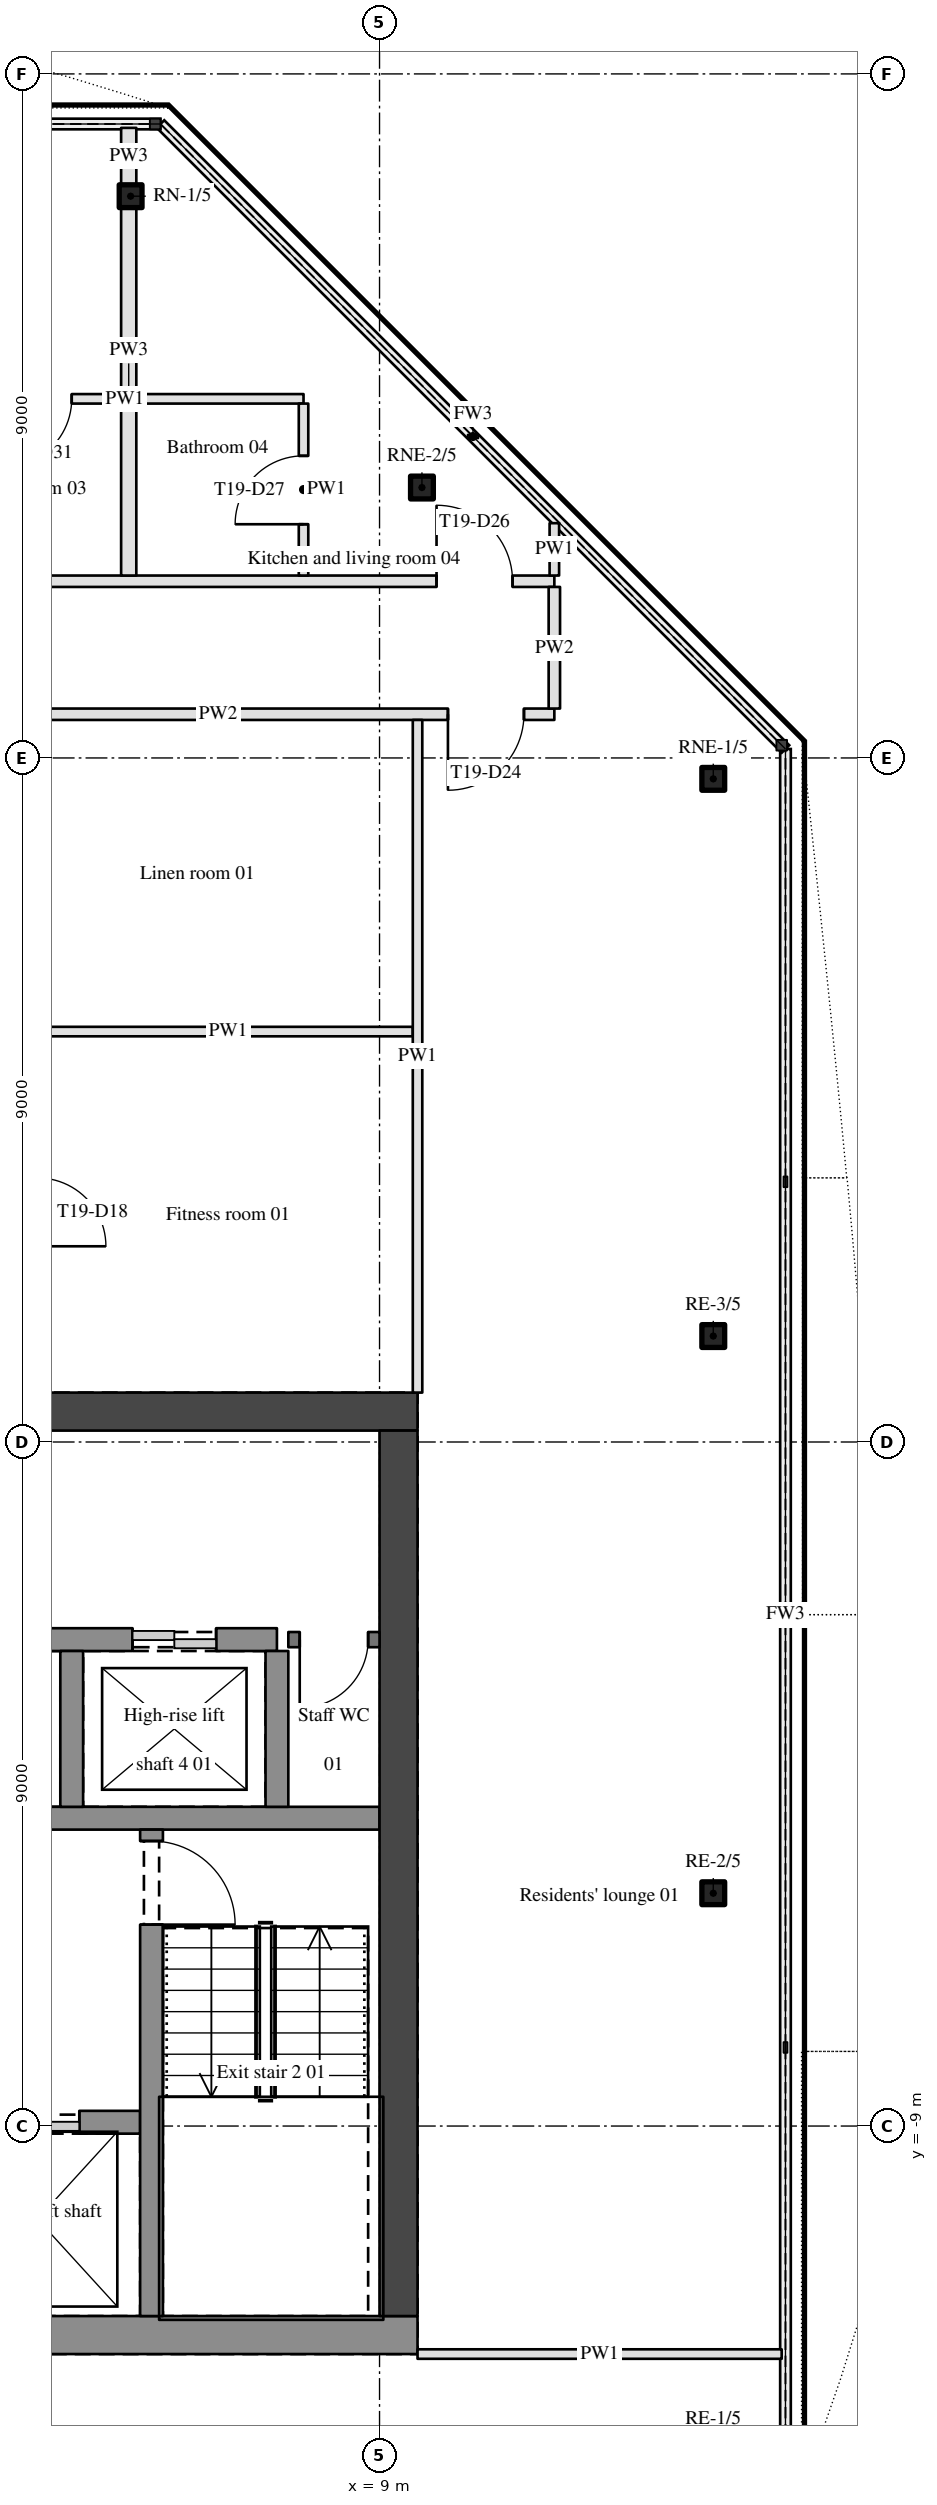
"""IFC4 building model, lengths in metres.
Left out: names, types, materials, properties, quantities, classifications, styles, units other than length and angle.
Written with IfcOpenShell. Run it as: python <this file> out.ifc"""

import sys

from ifc_helpers import new_model, si_unit, direction, frame, frame_2d, origin, origin_2d, place, context, subcontext, project, spatial, rectangle, hollow_rectangle, extrude, element, fill, save


model = new_model("IFC4")
c1 = context("Model", 3, precision=1e-05, world=origin(), true_north=direction((0.0, 1.0)))
c2 = subcontext(c1, "Body", "Model", "MODEL_VIEW")
j1 = project(units=[si_unit("LENGTHUNIT", "METRE"), si_unit("PLANEANGLEUNIT", "RADIAN")], contexts=[c1])
p1 = place(None, origin())
s1 = spatial("IfcSite", under=j1, at=p1, CompositionType="ELEMENT")
p2 = place(p1, origin())
s2 = spatial("IfcBuilding", under=s1, at=p2, CompositionType="ELEMENT")
p3 = place(p2, frame((0.0, 0.0, 251.85)))
s3 = spatial("IfcBuildingStorey", under=s2, at=p3, CompositionType="ELEMENT", Elevation=251.85)
for number, where, z_axis, x_axis in (
    (1, (13.391, -5.937, 0.0), (0.0, 0.0, 1.0), (1.0, 0.0, 0.0)),
    (2, (13.391, 1.394, 0.0), (0.0, 0.0, 1.0), (1.0, 0.0, 0.0)),
    (3, (13.391, 8.725, 0.0), (0.0, 0.0, 1.0), (1.0, 0.0, 0.0)),
    (4, (9.558, 12.558, 0.0), (0.0, 0.0, 1.0), (1.0, 0.0, 0.0)),
    (5, (5.725, 16.391, 0.0), (0.0, 0.0, 1.0), (1.0, 0.0, 0.0)),
):
    element("IfcColumn", number, at=place(p3, frame(where, z_axis=z_axis, x_axis=x_axis)), inside=s3, PredefinedType="COLUMN", context=c2, shape_type="SweptSolid", body=[
        extrude(hollow_rectangle(XDim=0.3, YDim=0.3, WallThickness=0.02, InnerFilletRadius=0.03, OuterFilletRadius=0.05, at=origin_2d()), origin(), (0.0, 0.0, 1.0), 3.15),
    ])
p4 = place(p3, frame((-9.5, -11.75, 0.0), z_axis=(0.0, 0.0, 1.0), x_axis=(1.0, 0.0, 0.0)))
e6 = element("IfcWall", 6, at=p4, inside=s3, PredefinedType="SHEAR", context=c2, shape_type="SweptSolid", body=[
    extrude(rectangle(XDim=19.0, YDim=0.5, at=frame_2d((9.5, 0.0))), origin(), (0.0, 0.0, 1.0), 3.15),
])
p5 = place(p3, frame((-9.5, 0.4, 0.0), z_axis=(0.0, 0.0, 1.0), x_axis=(1.0, 0.0, 0.0)))
e7 = element("IfcWall", 7, at=p5, inside=s3, PredefinedType="SHEAR", context=c2, shape_type="SweptSolid", body=[
    extrude(rectangle(XDim=19.0, YDim=0.5, at=frame_2d((9.5, 0.0))), origin(), (0.0, 0.0, 1.0), 3.15),
])
p6 = place(p5, frame((8.6, 0.0, 0.0)))
e8 = element("IfcOpeningElement", 8, at=p6, cuts=e7, PredefinedType="OPENING", context=c2, shape_type="SweptSolid", body=[
    extrude(rectangle(XDim=1.8, YDim=2.1, at=frame_2d((0.9, 1.05))), frame((0.0, 0.26, 0.0), z_axis=(0.0, -1.0, 0.0), x_axis=(1.0, 0.0, 0.0)), (0.0, 0.0, 1.0), 0.52),
])
p7 = place(p5, frame((2.55, 0.0, 0.0)))
e9 = element("IfcOpeningElement", 9, at=p7, cuts=e7, PredefinedType="OPENING", context=c2, shape_type="SweptSolid", body=[
    extrude(rectangle(XDim=0.9, YDim=2.1, at=frame_2d((0.45, 1.05))), frame((0.0, 0.26, 0.0), z_axis=(0.0, -1.0, 0.0), x_axis=(1.0, 0.0, 0.0)), (0.0, 0.0, 1.0), 0.52),
])
p8 = place(p3, frame((9.25, -11.5, 0.0), z_axis=(0.0, 0.0, 1.0), x_axis=(0.0, 1.0, 0.0)))
e10 = element("IfcWall", 10, at=p8, inside=s3, PredefinedType="SHEAR", context=c2, shape_type="SweptSolid", body=[
    extrude(rectangle(XDim=11.65, YDim=0.5, at=frame_2d((5.825, 0.0))), origin(), (0.0, 0.0, 1.0), 3.15),
])
p9 = place(p3, frame((9.5, -12.0, 0.0), z_axis=(0.0, 0.0, 1.0), x_axis=(1.0, 0.0, 0.0)))
e11 = element("IfcWall", 11, at=p9, inside=s3, PredefinedType="PARTITIONING", context=c2, shape_type="SweptSolid", body=[
    extrude(rectangle(XDim=4.791, YDim=0.125, at=frame_2d((2.396, 0.0))), origin(), (0.0, 0.0, 1.0), 2.21),
])
p10 = place(p3, frame((-5.85, -8.95, 0.0), z_axis=(0.0, 0.0, 1.0), x_axis=(1.0, 0.0, 0.0)))
e12 = element("IfcWall", 12, at=p10, inside=s3, PredefinedType="SHEAR", context=c2, shape_type="SweptSolid", body=[
    extrude(rectangle(XDim=11.7, YDim=0.3, at=frame_2d((5.85, 0.0))), origin(), (0.0, 0.0, 1.0), 3.15),
])
p11 = place(p10, frame((0.8, 0.0, 0.0)))
e13 = element("IfcOpeningElement", 13, at=p11, cuts=e12, PredefinedType="OPENING", context=c2, shape_type="SweptSolid", body=[
    extrude(rectangle(XDim=1.1, YDim=2.1, at=frame_2d((0.55, 1.05))), frame((0.0, 0.16, 0.0), z_axis=(0.0, -1.0, 0.0), x_axis=(1.0, 0.0, 0.0)), (0.0, 0.0, 1.0), 0.32),
])
p12 = place(p10, frame((3.8, 0.0, 0.0)))
e14 = element("IfcOpeningElement", 14, at=p12, cuts=e12, PredefinedType="OPENING", context=c2, shape_type="SweptSolid", body=[
    extrude(rectangle(XDim=1.1, YDim=2.1, at=frame_2d((0.55, 1.05))), frame((0.0, 0.16, 0.0), z_axis=(0.0, -1.0, 0.0), x_axis=(1.0, 0.0, 0.0)), (0.0, 0.0, 1.0), 0.32),
])
p13 = place(p10, frame((6.8, 0.0, 0.0)))
e15 = element("IfcOpeningElement", 15, at=p13, cuts=e12, PredefinedType="OPENING", context=c2, shape_type="SweptSolid", body=[
    extrude(rectangle(XDim=1.1, YDim=2.1, at=frame_2d((0.55, 1.05))), frame((0.0, 0.16, 0.0), z_axis=(0.0, -1.0, 0.0), x_axis=(1.0, 0.0, 0.0)), (0.0, 0.0, 1.0), 0.32),
])
p14 = place(p10, frame((9.8, 0.0, 0.0)))
e16 = element("IfcOpeningElement", 16, at=p14, cuts=e12, PredefinedType="OPENING", context=c2, shape_type="SweptSolid", body=[
    extrude(rectangle(XDim=1.1, YDim=2.1, at=frame_2d((0.55, 1.05))), frame((0.0, 0.16, 0.0), z_axis=(0.0, -1.0, 0.0), x_axis=(1.0, 0.0, 0.0)), (0.0, 0.0, 1.0), 0.32),
])
p15 = place(p3, frame((2.25, -4.95, 0.0), z_axis=(0.0, 0.0, 1.0), x_axis=(1.0, 0.0, 0.0)))
e17 = element("IfcWall", 17, at=p15, inside=s3, PredefinedType="SHEAR", context=c2, shape_type="SweptSolid", body=[
    extrude(rectangle(XDim=6.75, YDim=0.3, at=frame_2d((3.375, 0.0))), origin(), (0.0, 0.0, 1.0), 3.15),
])
p16 = place(p3, frame((2.25, -2.6, 0.0), z_axis=(0.0, 0.0, 1.0), x_axis=(1.0, 0.0, 0.0)))
e18 = element("IfcWall", 18, at=p16, inside=s3, PredefinedType="SHEAR", context=c2, shape_type="SweptSolid", body=[
    extrude(rectangle(XDim=5.4, YDim=0.3, at=frame_2d((2.7, 0.0))), origin(), (0.0, 0.0, 1.0), 3.15),
])
p17 = place(p16, frame((0.8, 0.0, 0.0)))
e19 = element("IfcOpeningElement", 19, at=p17, cuts=e18, PredefinedType="OPENING", context=c2, shape_type="SweptSolid", body=[
    extrude(rectangle(XDim=1.1, YDim=2.1, at=frame_2d((0.55, 1.05))), frame((0.0, 0.16, 0.0), z_axis=(0.0, -1.0, 0.0), x_axis=(1.0, 0.0, 0.0)), (0.0, 0.0, 1.0), 0.32),
])
p18 = place(p16, frame((3.5, 0.0, 0.0)))
e20 = element("IfcOpeningElement", 20, at=p18, cuts=e18, PredefinedType="OPENING", context=c2, shape_type="SweptSolid", body=[
    extrude(rectangle(XDim=1.1, YDim=2.1, at=frame_2d((0.55, 1.05))), frame((0.0, 0.16, 0.0), z_axis=(0.0, -1.0, 0.0), x_axis=(1.0, 0.0, 0.0)), (0.0, 0.0, 1.0), 0.32),
])
p19 = place(p3, frame((9.0, -2.6, 0.0), z_axis=(0.0, 0.0, 1.0), x_axis=(-1.0, 0.0, 0.0)))
e21 = element("IfcWall", 21, at=p19, inside=s3, PredefinedType="SOLIDWALL", context=c2, shape_type="SweptSolid", body=[
    extrude(rectangle(XDim=1.2, YDim=0.2, at=frame_2d((0.6, 0.0))), origin(), (0.0, 0.0, 1.0), 2.85),
])
p20 = place(p19, frame((0.15, 0.0, 0.0)))
e22 = element("IfcOpeningElement", 22, at=p20, cuts=e21, PredefinedType="OPENING", context=c2, shape_type="SweptSolid", body=[
    extrude(rectangle(XDim=0.9, YDim=2.1, at=frame_2d((0.45, 1.05))), frame((0.0, 0.11, 0.0), z_axis=(0.0, -1.0, 0.0), x_axis=(1.0, 0.0, 0.0)), (0.0, 0.0, 1.0), 0.22),
])
p21 = place(p3, frame((4.575, 5.4, 0.0), z_axis=(0.0, 0.0, 1.0), x_axis=(1.0, 0.0, 0.0)))
e23 = element("IfcWall", 23, at=p21, inside=s3, PredefinedType="PARTITIONING", context=c2, shape_type="SweptSolid", body=[
    extrude(rectangle(XDim=4.863, YDim=0.125, at=frame_2d((2.431, 0.0))), origin(), (0.0, 0.0, 1.0), 2.21),
])
p22 = place(p3, frame((11.3, 9.575, 0.0), z_axis=(0.0, 0.0, 1.0), x_axis=(-1.0, 0.0, 0.0)))
e24 = element("IfcWall", 24, at=p22, inside=s3, PredefinedType="PARTITIONING", context=c2, shape_type="SweptSolid", body=[
    extrude(rectangle(XDim=8.85, YDim=0.15, at=frame_2d((4.425, 0.0))), origin(), (0.0, 0.0, 1.0), 2.21),
])
p23 = place(p22, frame((0.4, 0.0, 0.0)))
e25 = element("IfcOpeningElement", 25, at=p23, cuts=e24, PredefinedType="OPENING", context=c2, shape_type="SweptSolid", body=[
    extrude(rectangle(XDim=1.0, YDim=2.1, at=frame_2d((0.5, 1.05))), frame((0.0, 0.085, 0.0), z_axis=(0.0, -1.0, 0.0), x_axis=(1.0, 0.0, 0.0)), (0.0, 0.0, 1.0), 0.17),
])
p24 = place(p3, frame((-11.275, 11.325, 0.0), z_axis=(0.0, 0.0, 1.0), x_axis=(1.0, 0.0, 0.0)))
e26 = element("IfcWall", 26, at=p24, inside=s3, PredefinedType="PARTITIONING", context=c2, shape_type="SweptSolid", body=[
    extrude(rectangle(XDim=22.575, YDim=0.15, at=frame_2d((11.288, 0.0))), origin(), (0.0, 0.0, 1.0), 2.21),
])
p25 = place(p24, frame((8.038, 0.0, 0.0)))
e27 = element("IfcOpeningElement", 27, at=p25, cuts=e26, PredefinedType="OPENING", context=c2, shape_type="SweptSolid", body=[
    extrude(rectangle(XDim=1.0, YDim=2.1, at=frame_2d((0.5, 1.05))), frame((0.0, 0.085, 0.0), z_axis=(0.0, -1.0, 0.0), x_axis=(1.0, 0.0, 0.0)), (0.0, 0.0, 1.0), 0.17),
])
p26 = place(p24, frame((21.025, 0.0, 0.0)))
e28 = element("IfcOpeningElement", 28, at=p26, cuts=e26, PredefinedType="OPENING", context=c2, shape_type="SweptSolid", body=[
    extrude(rectangle(XDim=1.0, YDim=2.1, at=frame_2d((0.5, 1.05))), frame((0.0, 0.085, 0.0), z_axis=(0.0, -1.0, 0.0), x_axis=(1.0, 0.0, 0.0)), (0.0, 0.0, 1.0), 0.17),
])
p27 = place(p3, frame((8.0, 13.725, 0.0), z_axis=(0.0, 0.0, 1.0), x_axis=(-1.0, 0.0, 0.0)))
e29 = element("IfcWall", 29, at=p27, inside=s3, PredefinedType="PARTITIONING", context=c2, shape_type="SweptSolid", body=[
    extrude(rectangle(XDim=4.7, YDim=0.125, at=frame_2d((2.35, 0.0))), origin(), (0.0, 0.0, 1.0), 2.21),
])
p28 = place(p27, frame((3.05, 0.0, 0.0)))
e30 = element("IfcOpeningElement", 30, at=p28, cuts=e29, PredefinedType="OPENING", context=c2, shape_type="SweptSolid", body=[
    extrude(rectangle(XDim=0.9, YDim=2.1, at=frame_2d((0.45, 1.05))), frame((0.0, 0.073, 0.0), z_axis=(0.0, -1.0, 0.0), x_axis=(1.0, 0.0, 0.0)), (0.0, 0.0, 1.0), 0.145),
])
p29 = place(p3, frame((4.95, -4.8, 0.0), z_axis=(0.0, 0.0, 1.0), x_axis=(0.0, 1.0, 0.0)))
e31 = element("IfcWall", 31, at=p29, inside=s3, PredefinedType="SHEAR", context=c2, shape_type="SweptSolid", body=[
    extrude(rectangle(XDim=2.05, YDim=0.3, at=frame_2d((1.025, 0.0))), origin(), (0.0, 0.0, 1.0), 3.15),
])
p30 = place(p3, frame((5.7, 11.4, 0.0), z_axis=(0.0, 0.0, 1.0), x_axis=(0.0, 1.0, 0.0)))
e32 = element("IfcWall", 32, at=p30, inside=s3, PredefinedType="PARTITIONING", context=c2, shape_type="SweptSolid", body=[
    extrude(rectangle(XDim=4.841, YDim=0.2, at=frame_2d((2.42, 0.0))), origin(), (0.0, 0.0, 1.0), 2.21),
])
p31 = place(p3, frame((5.7, 16.541, 0.0), z_axis=(0.0, 0.0, 1.0), x_axis=(0.0, 1.0, 0.0)))
e33 = element("IfcWall", 33, at=p31, inside=s3, PredefinedType="PARTITIONING", context=c2, shape_type="SweptSolid", body=[
    extrude(rectangle(XDim=0.749, YDim=0.2, at=frame_2d((0.375, 0.0))), origin(), (0.0, 0.0, 1.0), 2.21),
])
p32 = place(p3, frame((6.0, -5.1, 0.0), z_axis=(0.0, 0.0, 1.0), x_axis=(0.0, -1.0, 0.0)))
e34 = element("IfcWall", 34, at=p32, inside=s3, PredefinedType="SHEAR", context=c2, shape_type="SweptSolid", body=[
    extrude(rectangle(XDim=6.4, YDim=0.3, at=frame_2d((3.2, 0.0))), origin(), (0.0, 0.0, 1.0), 3.15),
])
p33 = place(p32, frame((0.15, 0.0, 0.0)))
e35 = element("IfcOpeningElement", 35, at=p33, cuts=e34, PredefinedType="OPENING", context=c2, shape_type="SweptSolid", body=[
    extrude(rectangle(XDim=1.1, YDim=2.1, at=frame_2d((0.55, 1.05))), frame((0.0, 0.16, 0.0), z_axis=(0.0, -1.0, 0.0), x_axis=(1.0, 0.0, 0.0)), (0.0, 0.0, 1.0), 0.32),
])
p34 = place(p3, frame((7.65, -4.8, 0.0), z_axis=(0.0, 0.0, 1.0), x_axis=(0.0, 1.0, 0.0)))
e36 = element("IfcWall", 36, at=p34, inside=s3, PredefinedType="SHEAR", context=c2, shape_type="SweptSolid", body=[
    extrude(rectangle(XDim=2.05, YDim=0.3, at=frame_2d((1.025, 0.0))), origin(), (0.0, 0.0, 1.0), 3.15),
])
p35 = place(p3, frame((8.0, 11.4, 0.0), z_axis=(0.0, 0.0, 1.0), x_axis=(0.0, 1.0, 0.0)))
e37 = element("IfcWall", 37, at=p35, inside=s3, PredefinedType="PARTITIONING", context=c2, shape_type="SweptSolid", body=[
    extrude(rectangle(XDim=2.263, YDim=0.125, at=frame_2d((1.131, 0.0))), origin(), (0.0, 0.0, 1.0), 2.21),
])
p36 = place(p35, frame((0.675, 0.0, 0.0)))
e38 = element("IfcOpeningElement", 38, at=p36, cuts=e37, PredefinedType="OPENING", context=c2, shape_type="SweptSolid", body=[
    extrude(rectangle(XDim=0.9, YDim=2.1, at=frame_2d((0.45, 1.05))), frame((0.0, 0.073, 0.0), z_axis=(0.0, -1.0, 0.0), x_axis=(1.0, 0.0, 0.0)), (0.0, 0.0, 1.0), 0.145),
])
p37 = place(p3, frame((9.5, 0.65, 0.0), z_axis=(0.0, 0.0, 1.0), x_axis=(0.0, 1.0, 0.0)))
e39 = element("IfcWall", 39, at=p37, inside=s3, PredefinedType="PARTITIONING", context=c2, shape_type="SweptSolid", body=[
    extrude(rectangle(XDim=8.85, YDim=0.125, at=frame_2d((4.425, 0.0))), origin(), (0.0, 0.0, 1.0), 2.21),
])
p38 = place(p3, frame((11.3, 9.65, 0.0), z_axis=(0.0, 0.0, 1.0), x_axis=(0.0, 1.0, 0.0)))
e40 = element("IfcWall", 40, at=p38, inside=s3, PredefinedType="PARTITIONING", context=c2, shape_type="SweptSolid", body=[
    extrude(rectangle(XDim=1.6, YDim=0.15, at=frame_2d((0.8, 0.0))), origin(), (0.0, 0.0, 1.0), 2.21),
])
p39 = place(p3, frame((11.3, 11.4, 0.0), z_axis=(0.0, 0.0, 1.0), x_axis=(0.0, 1.0, 0.0)))
e41 = element("IfcWall", 41, at=p39, inside=s3, PredefinedType="PARTITIONING", context=c2, shape_type="SweptSolid", body=[
    extrude(rectangle(XDim=0.689, YDim=0.125, at=frame_2d((0.345, 0.0))), origin(), (0.0, 0.0, 1.0), 2.21),
])
p40 = place(p26, origin())
e42 = element("IfcDoor", 42, at=p40, inside=s3, OperationType="SINGLE_SWING_LEFT", PredefinedType="DOOR", context=c2, shape_type="SweptSolid", body=[
    extrude(rectangle(XDim=1.0, YDim=2.1, at=frame_2d((0.5, 1.05))), frame((0.0, 0.025, 0.0), z_axis=(0.0, -1.0, 0.0), x_axis=(1.0, 0.0, 0.0)), (0.0, 0.0, 1.0), 0.05),
])
fill(e28, e42)
p41 = place(p33, origin())
e43 = element("IfcDoor", 43, at=p41, inside=s3, OperationType="SINGLE_SWING_RIGHT", PredefinedType="DOOR", context=c2, shape_type="SweptSolid", body=[
    extrude(rectangle(XDim=1.1, YDim=2.1, at=frame_2d((0.55, 1.05))), frame((0.0, 0.025, 0.0), z_axis=(0.0, -1.0, 0.0), x_axis=(1.0, 0.0, 0.0)), (0.0, 0.0, 1.0), 0.05),
])
fill(e35, e43)
p42 = place(p20, origin())
e44 = element("IfcDoor", 44, at=p42, inside=s3, OperationType="SINGLE_SWING_RIGHT", PredefinedType="DOOR", context=c2, shape_type="SweptSolid", body=[
    extrude(rectangle(XDim=0.9, YDim=2.1, at=frame_2d((0.45, 1.05))), frame((0.0, 0.025, 0.0), z_axis=(0.0, -1.0, 0.0), x_axis=(1.0, 0.0, 0.0)), (0.0, 0.0, 1.0), 0.05),
])
fill(e22, e44)
p43 = place(p23, origin())
e45 = element("IfcDoor", 45, at=p43, inside=s3, OperationType="SINGLE_SWING_RIGHT", PredefinedType="DOOR", context=c2, shape_type="SweptSolid", body=[
    extrude(rectangle(XDim=1.0, YDim=2.1, at=frame_2d((0.5, 1.05))), frame((0.0, 0.025, 0.0), z_axis=(0.0, -1.0, 0.0), x_axis=(1.0, 0.0, 0.0)), (0.0, 0.0, 1.0), 0.05),
])
fill(e25, e45)
p44 = place(p28, origin())
e46 = element("IfcDoor", 46, at=p44, inside=s3, OperationType="SINGLE_SWING_RIGHT", PredefinedType="DOOR", context=c2, shape_type="SweptSolid", body=[
    extrude(rectangle(XDim=0.9, YDim=2.1, at=frame_2d((0.45, 1.05))), frame((0.0, 0.025, 0.0), z_axis=(0.0, -1.0, 0.0), x_axis=(1.0, 0.0, 0.0)), (0.0, 0.0, 1.0), 0.05),
])
fill(e30, e46)
p45 = place(p36, origin())
e47 = element("IfcDoor", 47, at=p45, inside=s3, OperationType="SINGLE_SWING_LEFT", PredefinedType="DOOR", context=c2, shape_type="SweptSolid", body=[
    extrude(rectangle(XDim=0.9, YDim=2.1, at=frame_2d((0.45, 1.05))), frame((0.0, 0.025, 0.0), z_axis=(0.0, -1.0, 0.0), x_axis=(1.0, 0.0, 0.0)), (0.0, 0.0, 1.0), 0.05),
])
fill(e38, e47)
p46 = place(p18, origin())
e48 = element("IfcDoor", 48, at=p46, inside=s3, OperationType="DOUBLE_DOOR_SLIDING", PredefinedType="DOOR", context=c2, shape_type="SweptSolid", body=[
    extrude(rectangle(XDim=1.1, YDim=2.1, at=frame_2d((0.55, 1.05))), frame((0.0, 0.025, 0.0), z_axis=(0.0, -1.0, 0.0), x_axis=(1.0, 0.0, 0.0)), (0.0, 0.0, 1.0), 0.05),
])
fill(e20, e48)
p47 = place(p14, origin())
e49 = element("IfcDoor", 49, at=p47, inside=s3, OperationType="DOUBLE_DOOR_SLIDING", PredefinedType="DOOR", context=c2, shape_type="SweptSolid", body=[
    extrude(rectangle(XDim=1.1, YDim=2.1, at=frame_2d((0.55, 1.05))), frame((0.0, 0.025, 0.0), z_axis=(0.0, -1.0, 0.0), x_axis=(1.0, 0.0, 0.0)), (0.0, 0.0, 1.0), 0.05),
])
fill(e16, e49)
save(model, sys.argv[1])
